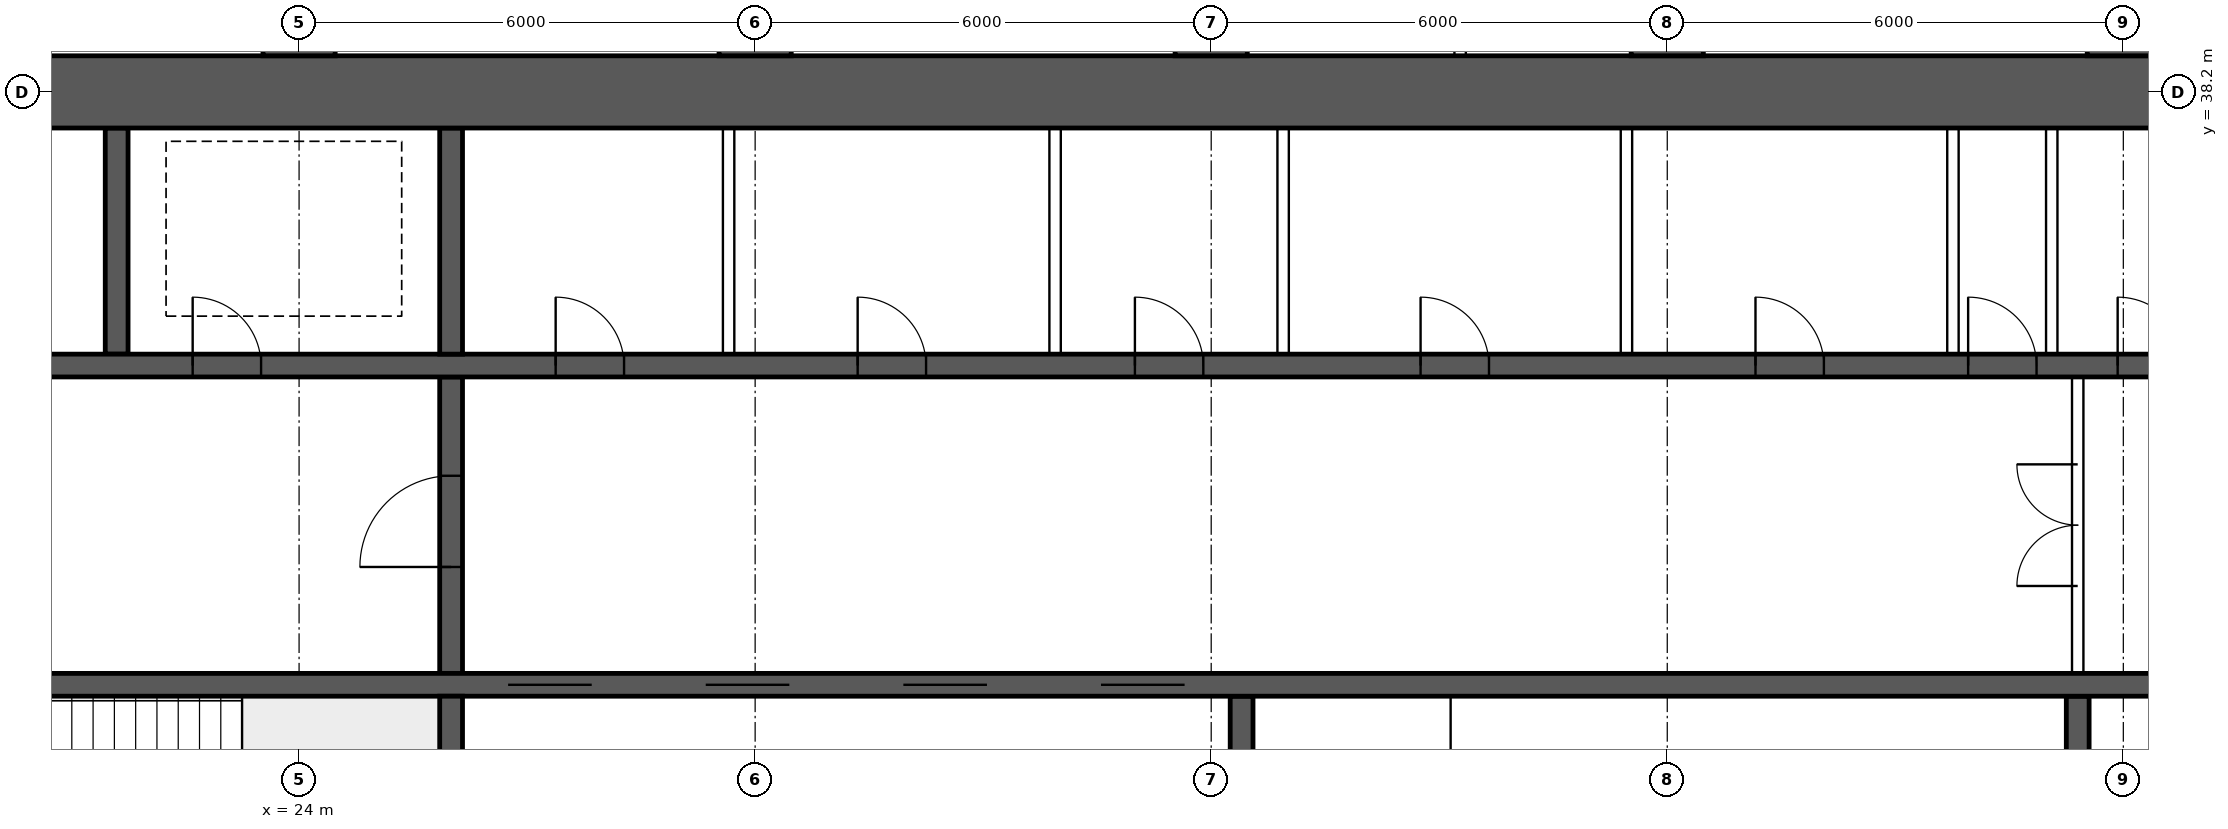
"""IFC4 building model, lengths in metres.
Left out: names, types, materials, properties, quantities, classifications, styles, units other than length and angle.
Written with IfcOpenShell. Run it as: python <this file> out.ifc"""

import sys

from ifc_helpers import new_model, si_unit, direction, frame, frame_2d, origin, place, context, subcontext, project, spatial, rectangle, extrude, element, fill, save


model = new_model("IFC4")
c1 = context("Model", 3, precision=1e-05, world=origin(), true_north=direction((0.0, 1.0)))
c2 = subcontext(c1, "Body", "Model", "MODEL_VIEW")
j1 = project(units=[si_unit("LENGTHUNIT", "METRE"), si_unit("PLANEANGLEUNIT", "RADIAN")], contexts=[c1])
p1 = place(None, origin())
s1 = spatial("IfcSite", under=j1, at=p1, CompositionType="ELEMENT")
p2 = place(p1, origin())
s2 = spatial("IfcBuilding", under=s1, at=p2, CompositionType="ELEMENT")
p3 = place(p2, frame((0.0, 0.0, 80.65)))
s3 = spatial("IfcBuildingStorey", under=s2, at=p3, CompositionType="ELEMENT", Elevation=80.65)
p4 = place(p3, frame((18.0, 38.2, 0.0), z_axis=(0.0, 0.0, 1.0), x_axis=(1.0, 0.0, 0.0)))
e1 = element("IfcWall", 1, at=p4, inside=s3, PredefinedType="SHEAR", context=c2, shape_type="SweptSolid", body=[
    extrude(rectangle(XDim=48.0, YDim=0.95, at=frame_2d((24.0, 0.0))), origin(), (0.0, 0.0, 1.0), 3.75),
])
p5 = place(p3, frame((18.475, 30.4, 0.0), z_axis=(0.0, 0.0, 1.0), x_axis=(1.0, 0.0, 0.0)))
e2 = element("IfcWall", 2, at=p5, inside=s3, PredefinedType="SHEAR", context=c2, shape_type="SweptSolid", body=[
    extrude(rectangle(XDim=47.05, YDim=0.3, at=frame_2d((23.525, 0.0))), origin(), (0.0, 0.0, 1.0), 3.75),
])
p6 = place(p5, frame((0.4, 0.0, 0.0)))
e3 = element("IfcOpeningElement", 3, at=p6, cuts=e2, PredefinedType="OPENING", context=c2, shape_type="SweptSolid", body=[
    extrude(rectangle(XDim=1.0, YDim=2.1, at=frame_2d((0.5, 1.05))), frame((0.0, 0.16, 0.0), z_axis=(0.0, -1.0, 0.0), x_axis=(1.0, 0.0, 0.0)), (0.0, 0.0, 1.0), 0.32),
])
p7 = place(p5, frame((45.65, 0.0, 0.0)))
e4 = element("IfcOpeningElement", 4, at=p7, cuts=e2, PredefinedType="OPENING", context=c2, shape_type="SweptSolid", body=[
    extrude(rectangle(XDim=1.0, YDim=2.1, at=frame_2d((0.5, 1.05))), frame((0.0, 0.16, 0.0), z_axis=(0.0, -1.0, 0.0), x_axis=(1.0, 0.0, 0.0)), (0.0, 0.0, 1.0), 0.32),
])
p8 = place(p5, frame((8.275, 0.0, 0.0)))
e5 = element("IfcOpeningElement", 5, at=p8, cuts=e2, PredefinedType="OPENING", context=c2, shape_type="SweptSolid", body=[
    extrude(rectangle(XDim=1.1, YDim=2.1, at=frame_2d((0.55, 1.05))), frame((0.0, 0.16, 0.0), z_axis=(0.0, -1.0, 0.0), x_axis=(1.0, 0.0, 0.0)), (0.0, 0.0, 1.0), 0.32),
])
p9 = place(p5, frame((10.875, 0.0, 0.0)))
e6 = element("IfcOpeningElement", 6, at=p9, cuts=e2, PredefinedType="OPENING", context=c2, shape_type="SweptSolid", body=[
    extrude(rectangle(XDim=1.1, YDim=2.1, at=frame_2d((0.55, 1.05))), frame((0.0, 0.16, 0.0), z_axis=(0.0, -1.0, 0.0), x_axis=(1.0, 0.0, 0.0)), (0.0, 0.0, 1.0), 0.32),
])
p10 = place(p5, frame((13.475, 0.0, 0.0)))
e7 = element("IfcOpeningElement", 7, at=p10, cuts=e2, PredefinedType="OPENING", context=c2, shape_type="SweptSolid", body=[
    extrude(rectangle(XDim=1.1, YDim=2.1, at=frame_2d((0.55, 1.05))), frame((0.0, 0.16, 0.0), z_axis=(0.0, -1.0, 0.0), x_axis=(1.0, 0.0, 0.0)), (0.0, 0.0, 1.0), 0.32),
])
p11 = place(p5, frame((16.075, 0.0, 0.0)))
e8 = element("IfcOpeningElement", 8, at=p11, cuts=e2, PredefinedType="OPENING", context=c2, shape_type="SweptSolid", body=[
    extrude(rectangle(XDim=1.1, YDim=2.1, at=frame_2d((0.55, 1.05))), frame((0.0, 0.16, 0.0), z_axis=(0.0, -1.0, 0.0), x_axis=(1.0, 0.0, 0.0)), (0.0, 0.0, 1.0), 0.32),
])
p12 = place(p5, frame((30.142, 0.0, 0.0)))
e9 = element("IfcOpeningElement", 9, at=p12, cuts=e2, PredefinedType="OPENING", context=c2, shape_type="SweptSolid", body=[
    extrude(rectangle(XDim=1.1, YDim=2.1, at=frame_2d((0.55, 1.05))), frame((0.0, 0.16, 0.0), z_axis=(0.0, -1.0, 0.0), x_axis=(1.0, 0.0, 0.0)), (0.0, 0.0, 1.0), 0.32),
])
p13 = place(p5, frame((33.675, 0.0, 0.0)))
e10 = element("IfcOpeningElement", 10, at=p13, cuts=e2, PredefinedType="OPENING", context=c2, shape_type="SweptSolid", body=[
    extrude(rectangle(XDim=1.1, YDim=2.1, at=frame_2d((0.55, 1.05))), frame((0.0, 0.16, 0.0), z_axis=(0.0, -1.0, 0.0), x_axis=(1.0, 0.0, 0.0)), (0.0, 0.0, 1.0), 0.32),
])
p14 = place(p5, frame((37.208, 0.0, 0.0)))
e11 = element("IfcOpeningElement", 11, at=p14, cuts=e2, PredefinedType="OPENING", context=c2, shape_type="SweptSolid", body=[
    extrude(rectangle(XDim=1.1, YDim=2.1, at=frame_2d((0.55, 1.05))), frame((0.0, 0.16, 0.0), z_axis=(0.0, -1.0, 0.0), x_axis=(1.0, 0.0, 0.0)), (0.0, 0.0, 1.0), 0.32),
])
p15 = place(p3, frame((18.475, 34.6, 0.0), z_axis=(0.0, 0.0, 1.0), x_axis=(1.0, 0.0, 0.0)))
e12 = element("IfcWall", 12, at=p15, inside=s3, PredefinedType="SHEAR", context=c2, shape_type="SweptSolid", body=[
    extrude(rectangle(XDim=47.05, YDim=0.3, at=frame_2d((23.525, 0.0))), origin(), (0.0, 0.0, 1.0), 3.75),
])
p16 = place(p15, frame((0.9, 0.0, 0.0)))
e13 = element("IfcOpeningElement", 13, at=p16, cuts=e12, PredefinedType="OPENING", context=c2, shape_type="SweptSolid", body=[
    extrude(rectangle(XDim=1.1, YDim=2.1, at=frame_2d((0.55, 1.05))), frame((0.0, 0.16, 0.0), z_axis=(0.0, -1.0, 0.0), x_axis=(1.0, 0.0, 0.0)), (0.0, 0.0, 1.0), 0.32),
])
p17 = place(p15, frame((45.05, 0.0, 0.0)))
e14 = element("IfcOpeningElement", 14, at=p17, cuts=e12, PredefinedType="OPENING", context=c2, shape_type="SweptSolid", body=[
    extrude(rectangle(XDim=1.1, YDim=2.1, at=frame_2d((0.55, 1.05))), frame((0.0, 0.16, 0.0), z_axis=(0.0, -1.0, 0.0), x_axis=(1.0, 0.0, 0.0)), (0.0, 0.0, 1.0), 0.32),
])
p18 = place(p15, frame((4.125, 0.0, 0.0)))
e15 = element("IfcOpeningElement", 15, at=p18, cuts=e12, PredefinedType="OPENING", context=c2, shape_type="SweptSolid", body=[
    extrude(rectangle(XDim=0.9, YDim=2.1, at=frame_2d((0.45, 1.05))), frame((0.0, 0.16, 0.0), z_axis=(0.0, -1.0, 0.0), x_axis=(1.0, 0.0, 0.0)), (0.0, 0.0, 1.0), 0.32),
])
p19 = place(p15, frame((42.025, 0.0, 0.0)))
e16 = element("IfcOpeningElement", 16, at=p19, cuts=e12, PredefinedType="OPENING", context=c2, shape_type="SweptSolid", body=[
    extrude(rectangle(XDim=0.9, YDim=2.1, at=frame_2d((0.45, 1.05))), frame((0.0, 0.16, 0.0), z_axis=(0.0, -1.0, 0.0), x_axis=(1.0, 0.0, 0.0)), (0.0, 0.0, 1.0), 0.32),
])
p20 = place(p15, frame((8.9, 0.0, 0.0)))
e17 = element("IfcOpeningElement", 17, at=p20, cuts=e12, PredefinedType="OPENING", context=c2, shape_type="SweptSolid", body=[
    extrude(rectangle(XDim=0.9, YDim=2.1, at=frame_2d((0.45, 1.05))), frame((0.0, 0.16, 0.0), z_axis=(0.0, -1.0, 0.0), x_axis=(1.0, 0.0, 0.0)), (0.0, 0.0, 1.0), 0.32),
])
p21 = place(p15, frame((12.874, 0.0, 0.0)))
e18 = element("IfcOpeningElement", 18, at=p21, cuts=e12, PredefinedType="OPENING", context=c2, shape_type="SweptSolid", body=[
    extrude(rectangle(XDim=0.9, YDim=2.1, at=frame_2d((0.45, 1.05))), frame((0.0, 0.16, 0.0), z_axis=(0.0, -1.0, 0.0), x_axis=(1.0, 0.0, 0.0)), (0.0, 0.0, 1.0), 0.32),
])
p22 = place(p15, frame((16.521, 0.0, 0.0)))
e19 = element("IfcOpeningElement", 19, at=p22, cuts=e12, PredefinedType="OPENING", context=c2, shape_type="SweptSolid", body=[
    extrude(rectangle(XDim=0.9, YDim=2.1, at=frame_2d((0.45, 1.05))), frame((0.0, 0.16, 0.0), z_axis=(0.0, -1.0, 0.0), x_axis=(1.0, 0.0, 0.0)), (0.0, 0.0, 1.0), 0.32),
])
p23 = place(p15, frame((20.28, 0.0, 0.0)))
e20 = element("IfcOpeningElement", 20, at=p23, cuts=e12, PredefinedType="OPENING", context=c2, shape_type="SweptSolid", body=[
    extrude(rectangle(XDim=0.9, YDim=2.1, at=frame_2d((0.45, 1.05))), frame((0.0, 0.16, 0.0), z_axis=(0.0, -1.0, 0.0), x_axis=(1.0, 0.0, 0.0)), (0.0, 0.0, 1.0), 0.32),
])
p24 = place(p15, frame((24.686, 0.0, 0.0)))
e21 = element("IfcOpeningElement", 21, at=p24, cuts=e12, PredefinedType="OPENING", context=c2, shape_type="SweptSolid", body=[
    extrude(rectangle(XDim=0.9, YDim=2.1, at=frame_2d((0.45, 1.05))), frame((0.0, 0.16, 0.0), z_axis=(0.0, -1.0, 0.0), x_axis=(1.0, 0.0, 0.0)), (0.0, 0.0, 1.0), 0.32),
])
p25 = place(p15, frame((27.483, 0.0, 0.0)))
e22 = element("IfcOpeningElement", 22, at=p25, cuts=e12, PredefinedType="OPENING", context=c2, shape_type="SweptSolid", body=[
    extrude(rectangle(XDim=0.9, YDim=2.1, at=frame_2d((0.45, 1.05))), frame((0.0, 0.16, 0.0), z_axis=(0.0, -1.0, 0.0), x_axis=(1.0, 0.0, 0.0)), (0.0, 0.0, 1.0), 0.32),
])
p26 = place(p15, frame((29.45, 0.0, 0.0)))
e23 = element("IfcOpeningElement", 23, at=p26, cuts=e12, PredefinedType="OPENING", context=c2, shape_type="SweptSolid", body=[
    extrude(rectangle(XDim=0.9, YDim=2.1, at=frame_2d((0.45, 1.05))), frame((0.0, 0.16, 0.0), z_axis=(0.0, -1.0, 0.0), x_axis=(1.0, 0.0, 0.0)), (0.0, 0.0, 1.0), 0.32),
])
p27 = place(p15, frame((31.882, 0.0, 0.0)))
e24 = element("IfcOpeningElement", 24, at=p27, cuts=e12, PredefinedType="OPENING", context=c2, shape_type="SweptSolid", body=[
    extrude(rectangle(XDim=0.9, YDim=2.1, at=frame_2d((0.45, 1.05))), frame((0.0, 0.16, 0.0), z_axis=(0.0, -1.0, 0.0), x_axis=(1.0, 0.0, 0.0)), (0.0, 0.0, 1.0), 0.32),
])
p28 = place(p15, frame((34.617, 0.0, 0.0)))
e25 = element("IfcOpeningElement", 25, at=p28, cuts=e12, PredefinedType="OPENING", context=c2, shape_type="SweptSolid", body=[
    extrude(rectangle(XDim=0.9, YDim=2.1, at=frame_2d((0.45, 1.05))), frame((0.0, 0.16, 0.0), z_axis=(0.0, -1.0, 0.0), x_axis=(1.0, 0.0, 0.0)), (0.0, 0.0, 1.0), 0.32),
])
p29 = place(p15, frame((37.656, 0.0, 0.0)))
e26 = element("IfcOpeningElement", 26, at=p29, cuts=e12, PredefinedType="OPENING", context=c2, shape_type="SweptSolid", body=[
    extrude(rectangle(XDim=0.9, YDim=2.1, at=frame_2d((0.45, 1.05))), frame((0.0, 0.16, 0.0), z_axis=(0.0, -1.0, 0.0), x_axis=(1.0, 0.0, 0.0)), (0.0, 0.0, 1.0), 0.32),
])
p30 = place(p3, frame((26.0, 26.275, 0.0), z_axis=(0.0, 0.0, 1.0), x_axis=(0.0, 1.0, 0.0)))
e27 = element("IfcWall", 27, at=p30, inside=s3, PredefinedType="SHEAR", context=c2, shape_type="SweptSolid", body=[
    extrude(rectangle(XDim=3.975, YDim=0.3, at=frame_2d((1.988, 0.0))), origin(), (0.0, 0.0, 1.0), 3.75),
])
p31 = place(p3, frame((26.0, 30.55, 0.0), z_axis=(0.0, 0.0, 1.0), x_axis=(0.0, 1.0, 0.0)))
e28 = element("IfcWall", 28, at=p31, inside=s3, PredefinedType="SHEAR", context=c2, shape_type="SweptSolid", body=[
    extrude(rectangle(XDim=3.9, YDim=0.3, at=frame_2d((1.95, 0.0))), origin(), (0.0, 0.0, 1.0), 3.75),
])
p32 = place(p31, frame((1.4, 0.0, 0.0)))
e29 = element("IfcOpeningElement", 29, at=p32, cuts=e28, PredefinedType="OPENING", context=c2, shape_type="SweptSolid", body=[
    extrude(rectangle(XDim=1.2, YDim=2.1, at=frame_2d((0.6, 1.05))), frame((0.0, 0.16, 0.0), z_axis=(0.0, -1.0, 0.0), x_axis=(1.0, 0.0, 0.0)), (0.0, 0.0, 1.0), 0.32),
])
for number, where, z_axis, x_axis in (
    (30, (21.6, 34.75, 0.0), (0.0, 0.0, 1.0), (0.0, 1.0, 0.0)),
    (31, (26.0, 34.75, 0.0), (0.0, 0.0, 1.0), (0.0, 1.0, 0.0)),
):
    element("IfcWall", number, at=place(p3, frame(where, z_axis=z_axis, x_axis=x_axis)), inside=s3, PredefinedType="SHEAR", context=c2, shape_type="SweptSolid", body=[
        extrude(rectangle(XDim=2.975, YDim=0.3, at=frame_2d((1.488, 0.0))), origin(), (0.0, 0.0, 1.0), 3.75),
    ])
for number, where, z_axis, x_axis in (
    (32, (36.4, 26.275, 0.0), (0.0, 0.0, 1.0), (0.0, 1.0, 0.0)),
    (33, (47.4, 26.275, 0.0), (0.0, 0.0, 1.0), (0.0, 1.0, 0.0)),
):
    element("IfcWall", number, at=place(p3, frame(where, z_axis=z_axis, x_axis=x_axis)), inside=s3, PredefinedType="SHEAR", context=c2, shape_type="SweptSolid", body=[
        extrude(rectangle(XDim=3.975, YDim=0.3, at=frame_2d((1.988, 0.0))), origin(), (0.0, 0.0, 1.0), 3.75),
    ])
for number, where, z_axis, x_axis in (
    (34, (24.0, 38.675, 0.0), (0.0, 0.0, 1.0), (0.0, 1.0, 0.0)),
    (35, (30.0, 38.675, 0.0), (0.0, 0.0, 1.0), (0.0, 1.0, 0.0)),
    (36, (36.0, 38.675, 0.0), (0.0, 0.0, 1.0), (0.0, 1.0, 0.0)),
    (37, (42.0, 38.675, 0.0), (0.0, 0.0, 1.0), (0.0, 1.0, 0.0)),
    (38, (48.0, 38.675, 0.0), (0.0, 0.0, 1.0), (0.0, 1.0, 0.0)),
):
    element("IfcWall", number, at=place(p3, frame(where, z_axis=z_axis, x_axis=x_axis)), inside=s3, PredefinedType="SHEAR", context=c2, shape_type="SweptSolid", body=[
        extrude(rectangle(XDim=9.325, YDim=0.95, at=frame_2d((4.663, 0.0))), origin(), (0.0, 0.0, 1.0), 3.75),
    ])
p33 = place(p3, frame((47.4, 30.55, 0.0), z_axis=(0.0, 0.0, 1.0), x_axis=(0.0, 1.0, 0.0)))
e39 = element("IfcWall", 39, at=p33, inside=s3, PredefinedType="SOLIDWALL", context=c2, shape_type="SweptSolid", body=[
    extrude(rectangle(XDim=3.9, YDim=0.15, at=frame_2d((1.95, 0.0))), origin(), (0.0, 0.0, 1.0), 3.3),
])
p34 = place(p33, frame((1.15, 0.0, 0.0)))
e40 = element("IfcOpeningElement", 40, at=p34, cuts=e39, PredefinedType="OPENING", context=c2, shape_type="SweptSolid", body=[
    extrude(rectangle(XDim=1.6, YDim=2.1, at=frame_2d((0.8, 1.05))), frame((0.0, 0.085, 0.0), z_axis=(0.0, -1.0, 0.0), x_axis=(1.0, 0.0, 0.0)), (0.0, 0.0, 1.0), 0.17),
])
for number, where, z_axis, x_axis in (
    (41, (29.651, 34.75, 0.0), (0.0, 0.0, 1.0), (0.0, 1.0, 0.0)),
    (42, (33.946, 34.75, 0.0), (0.0, 0.0, 1.0), (0.0, 1.0, 0.0)),
    (43, (36.946, 34.75, 0.0), (0.0, 0.0, 1.0), (0.0, 1.0, 0.0)),
    (44, (41.463, 34.75, 0.0), (0.0, 0.0, 1.0), (0.0, 1.0, 0.0)),
    (45, (45.758, 34.75, 0.0), (0.0, 0.0, 1.0), (0.0, 1.0, 0.0)),
    (46, (47.058, 34.75, 0.0), (0.0, 0.0, 1.0), (0.0, 1.0, 0.0)),
):
    element("IfcWall", number, at=place(p3, frame(where, z_axis=z_axis, x_axis=x_axis)), inside=s3, PredefinedType="SOLIDWALL", context=c2, shape_type="SweptSolid", body=[
        extrude(rectangle(XDim=2.975, YDim=0.15, at=frame_2d((1.488, 0.0))), origin(), (0.0, 0.0, 1.0), 3.3),
    ])
p35 = place(p3, frame((39.275, 38.675, 0.0), z_axis=(0.0, 0.0, 1.0), x_axis=(0.0, 1.0, 0.0)))
e47 = element("IfcWall", 47, at=p35, inside=s3, PredefinedType="PARTITIONING", context=c2, shape_type="SweptSolid", body=[
    extrude(rectangle(XDim=9.225, YDim=0.15, at=frame_2d((4.612, 0.0))), origin(), (0.0, 0.0, 1.0), 3.3),
])
p36 = place(p34, origin())
e48 = element("IfcDoor", 48, at=p36, inside=s3, OperationType="DOUBLE_DOOR_SINGLE_SWING", PredefinedType="DOOR", context=c2, shape_type="SweptSolid", body=[
    extrude(rectangle(XDim=1.6, YDim=2.1, at=frame_2d((0.8, 1.05))), frame((0.0, 0.025, 0.0), z_axis=(0.0, -1.0, 0.0), x_axis=(1.0, 0.0, 0.0)), (0.0, 0.0, 1.0), 0.05),
])
fill(e40, e48)
p37 = place(p18, origin())
e49 = element("IfcDoor", 49, at=p37, inside=s3, OperationType="SINGLE_SWING_LEFT", PredefinedType="DOOR", context=c2, shape_type="SweptSolid", body=[
    extrude(rectangle(XDim=0.9, YDim=2.1, at=frame_2d((0.45, 1.05))), frame((0.0, 0.025, 0.0), z_axis=(0.0, -1.0, 0.0), x_axis=(1.0, 0.0, 0.0)), (0.0, 0.0, 1.0), 0.05),
])
fill(e15, e49)
p38 = place(p32, origin())
e50 = element("IfcDoor", 50, at=p38, inside=s3, OperationType="SINGLE_SWING_LEFT", PredefinedType="DOOR", context=c2, shape_type="SweptSolid", body=[
    extrude(rectangle(XDim=1.2, YDim=2.1, at=frame_2d((0.6, 1.05))), frame((0.0, 0.025, 0.0), z_axis=(0.0, -1.0, 0.0), x_axis=(1.0, 0.0, 0.0)), (0.0, 0.0, 1.0), 0.05),
])
fill(e29, e50)
p39 = place(p20, origin())
e51 = element("IfcDoor", 51, at=p39, inside=s3, OperationType="SINGLE_SWING_LEFT", PredefinedType="DOOR", context=c2, shape_type="SweptSolid", body=[
    extrude(rectangle(XDim=0.9, YDim=2.1, at=frame_2d((0.45, 1.05))), frame((0.0, 0.025, 0.0), z_axis=(0.0, -1.0, 0.0), x_axis=(1.0, 0.0, 0.0)), (0.0, 0.0, 1.0), 0.05),
])
fill(e17, e51)
p40 = place(p21, origin())
e52 = element("IfcDoor", 52, at=p40, inside=s3, OperationType="SINGLE_SWING_LEFT", PredefinedType="DOOR", context=c2, shape_type="SweptSolid", body=[
    extrude(rectangle(XDim=0.9, YDim=2.1, at=frame_2d((0.45, 1.05))), frame((0.0, 0.025, 0.0), z_axis=(0.0, -1.0, 0.0), x_axis=(1.0, 0.0, 0.0)), (0.0, 0.0, 1.0), 0.05),
])
fill(e18, e52)
p41 = place(p22, origin())
e53 = element("IfcDoor", 53, at=p41, inside=s3, OperationType="SINGLE_SWING_LEFT", PredefinedType="DOOR", context=c2, shape_type="SweptSolid", body=[
    extrude(rectangle(XDim=0.9, YDim=2.1, at=frame_2d((0.45, 1.05))), frame((0.0, 0.025, 0.0), z_axis=(0.0, -1.0, 0.0), x_axis=(1.0, 0.0, 0.0)), (0.0, 0.0, 1.0), 0.05),
])
fill(e19, e53)
p42 = place(p23, origin())
e54 = element("IfcDoor", 54, at=p42, inside=s3, OperationType="SINGLE_SWING_LEFT", PredefinedType="DOOR", context=c2, shape_type="SweptSolid", body=[
    extrude(rectangle(XDim=0.9, YDim=2.1, at=frame_2d((0.45, 1.05))), frame((0.0, 0.025, 0.0), z_axis=(0.0, -1.0, 0.0), x_axis=(1.0, 0.0, 0.0)), (0.0, 0.0, 1.0), 0.05),
])
fill(e20, e54)
p43 = place(p24, origin())
e55 = element("IfcDoor", 55, at=p43, inside=s3, OperationType="SINGLE_SWING_LEFT", PredefinedType="DOOR", context=c2, shape_type="SweptSolid", body=[
    extrude(rectangle(XDim=0.9, YDim=2.1, at=frame_2d((0.45, 1.05))), frame((0.0, 0.025, 0.0), z_axis=(0.0, -1.0, 0.0), x_axis=(1.0, 0.0, 0.0)), (0.0, 0.0, 1.0), 0.05),
])
fill(e21, e55)
p44 = place(p25, origin())
e56 = element("IfcDoor", 56, at=p44, inside=s3, OperationType="SINGLE_SWING_LEFT", PredefinedType="DOOR", context=c2, shape_type="SweptSolid", body=[
    extrude(rectangle(XDim=0.9, YDim=2.1, at=frame_2d((0.45, 1.05))), frame((0.0, 0.025, 0.0), z_axis=(0.0, -1.0, 0.0), x_axis=(1.0, 0.0, 0.0)), (0.0, 0.0, 1.0), 0.05),
])
fill(e22, e56)
p45 = place(p26, origin())
e57 = element("IfcDoor", 57, at=p45, inside=s3, OperationType="SINGLE_SWING_LEFT", PredefinedType="DOOR", context=c2, shape_type="SweptSolid", body=[
    extrude(rectangle(XDim=0.9, YDim=2.1, at=frame_2d((0.45, 1.05))), frame((0.0, 0.025, 0.0), z_axis=(0.0, -1.0, 0.0), x_axis=(1.0, 0.0, 0.0)), (0.0, 0.0, 1.0), 0.05),
])
fill(e23, e57)
p46 = place(p8, origin())
e58 = element("IfcDoor", 58, at=p46, inside=s3, OperationType="DOUBLE_DOOR_SLIDING", PredefinedType="DOOR", context=c2, shape_type="SweptSolid", body=[
    extrude(rectangle(XDim=1.1, YDim=2.1, at=frame_2d((0.55, 1.05))), frame((0.0, 0.025, 0.0), z_axis=(0.0, -1.0, 0.0), x_axis=(1.0, 0.0, 0.0)), (0.0, 0.0, 1.0), 0.05),
])
fill(e5, e58)
p47 = place(p9, origin())
e59 = element("IfcDoor", 59, at=p47, inside=s3, OperationType="DOUBLE_DOOR_SLIDING", PredefinedType="DOOR", context=c2, shape_type="SweptSolid", body=[
    extrude(rectangle(XDim=1.1, YDim=2.1, at=frame_2d((0.55, 1.05))), frame((0.0, 0.025, 0.0), z_axis=(0.0, -1.0, 0.0), x_axis=(1.0, 0.0, 0.0)), (0.0, 0.0, 1.0), 0.05),
])
fill(e6, e59)
p48 = place(p10, origin())
e60 = element("IfcDoor", 60, at=p48, inside=s3, OperationType="DOUBLE_DOOR_SLIDING", PredefinedType="DOOR", context=c2, shape_type="SweptSolid", body=[
    extrude(rectangle(XDim=1.1, YDim=2.1, at=frame_2d((0.55, 1.05))), frame((0.0, 0.025, 0.0), z_axis=(0.0, -1.0, 0.0), x_axis=(1.0, 0.0, 0.0)), (0.0, 0.0, 1.0), 0.05),
])
fill(e7, e60)
p49 = place(p11, origin())
e61 = element("IfcDoor", 61, at=p49, inside=s3, OperationType="DOUBLE_DOOR_SLIDING", PredefinedType="DOOR", context=c2, shape_type="SweptSolid", body=[
    extrude(rectangle(XDim=1.1, YDim=2.1, at=frame_2d((0.55, 1.05))), frame((0.0, 0.025, 0.0), z_axis=(0.0, -1.0, 0.0), x_axis=(1.0, 0.0, 0.0)), (0.0, 0.0, 1.0), 0.05),
])
fill(e8, e61)
save(model, sys.argv[1])
